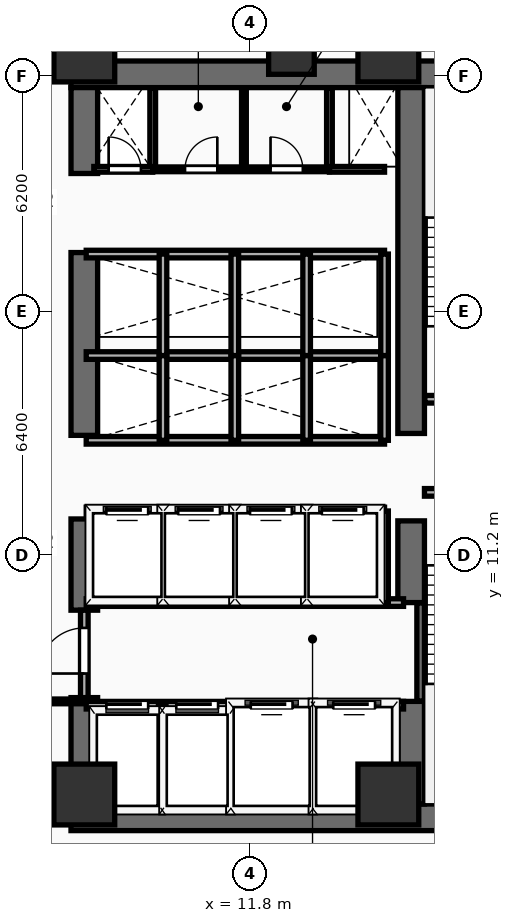
"""IFC4 building model, lengths in metres.
Left out: names, types, materials, properties, quantities, classifications, styles, units other than length and angle.
Written with IfcOpenShell. Run it as: python <this file> out.ifc"""

import sys

from ifc_helpers import new_model, si_unit, direction, frame, frame_2d, origin, origin_2d, place, context, subcontext, project, spatial, rectangle, extrude, element, fill, save


model = new_model("IFC4")
c1 = context("Model", 3, precision=1e-05, world=origin(), true_north=direction((0.0, 1.0)))
c2 = subcontext(c1, "Body", "Model", "MODEL_VIEW")
j1 = project(units=[si_unit("LENGTHUNIT", "METRE"), si_unit("PLANEANGLEUNIT", "RADIAN")], contexts=[c1])
p1 = place(None, origin())
s1 = spatial("IfcSite", under=j1, at=p1, CompositionType="ELEMENT")
p2 = place(p1, origin())
s2 = spatial("IfcBuilding", under=s1, at=p2, CompositionType="ELEMENT")
p3 = place(p2, frame((0.0, 0.0, 41.0)))
s3 = spatial("IfcBuildingStorey", under=s2, at=p3, CompositionType="ELEMENT", Elevation=41.0)
for number, where, z_axis, x_axis in (
    (1, (7.1, 4.3, 0.0), (0.0, 0.0, 1.0), (1.0, 0.0, 0.0)),
    (2, (7.1, 23.85, 0.0), (0.0, 0.0, 1.0), (1.0, 0.0, 0.0)),
):
    element("IfcWall", number, at=place(p3, frame(where, z_axis=z_axis, x_axis=x_axis)), inside=s3, PredefinedType="SHEAR", context=c2, shape_type="SweptSolid", body=[
        extrude(rectangle(XDim=14.05, YDim=0.7, at=frame_2d((7.025, 0.0))), origin(), (0.0, 0.0, 1.0), 3.54),
    ])
p4 = place(p3, frame((7.45, 4.65, 0.0), z_axis=(0.0, 0.0, 1.0), x_axis=(0.0, 1.0, 0.0)))
e3 = element("IfcWall", 3, at=p4, inside=s3, PredefinedType="SHEAR", context=c2, shape_type="SweptSolid", body=[
    extrude(rectangle(XDim=2.8, YDim=0.7, at=frame_2d((1.4, 0.0))), origin(), (0.0, 0.0, 1.0), 3.54),
])
p5 = place(p3, frame((7.45, 9.75, 0.0), z_axis=(0.0, 0.0, 1.0), x_axis=(0.0, 1.0, 0.0)))
e4 = element("IfcWall", 4, at=p5, inside=s3, PredefinedType="SHEAR", context=c2, shape_type="SweptSolid", body=[
    extrude(rectangle(XDim=2.4, YDim=0.7, at=frame_2d((1.2, 0.0))), origin(), (0.0, 0.0, 1.0), 3.54),
])
p6 = place(p3, frame((7.45, 14.35, 0.0), z_axis=(0.0, 0.0, 1.0), x_axis=(0.0, 1.0, 0.0)))
e5 = element("IfcWall", 5, at=p6, inside=s3, PredefinedType="SHEAR", context=c2, shape_type="SweptSolid", body=[
    extrude(rectangle(XDim=4.81, YDim=0.7, at=frame_2d((2.405, 0.0))), origin(), (0.0, 0.0, 1.0), 3.54),
])
p7 = place(p3, frame((7.45, 21.24, 0.0), z_axis=(0.0, 0.0, 1.0), x_axis=(0.0, 1.0, 0.0)))
e6 = element("IfcWall", 6, at=p7, inside=s3, PredefinedType="SHEAR", context=c2, shape_type="SweptSolid", body=[
    extrude(rectangle(XDim=2.26, YDim=0.7, at=frame_2d((1.13, 0.0))), origin(), (0.0, 0.0, 1.0), 3.54),
])
p8 = place(p3, frame((16.05, 4.65, 0.0), z_axis=(0.0, 0.0, 1.0), x_axis=(0.0, 1.0, 0.0)))
e7 = element("IfcWall", 7, at=p8, inside=s3, PredefinedType="SHEAR", context=c2, shape_type="SweptSolid", body=[
    extrude(rectangle(XDim=2.7, YDim=0.7, at=frame_2d((1.35, 0.0))), origin(), (0.0, 0.0, 1.0), 3.54),
])
p9 = place(p3, frame((16.05, 9.95, 0.0), z_axis=(0.0, 0.0, 1.0), x_axis=(0.0, 1.0, 0.0)))
e8 = element("IfcWall", 8, at=p9, inside=s3, PredefinedType="SHEAR", context=c2, shape_type="SweptSolid", body=[
    extrude(rectangle(XDim=2.15, YDim=0.7, at=frame_2d((1.075, 0.0))), origin(), (0.0, 0.0, 1.0), 3.54),
])
p10 = place(p3, frame((16.05, 14.4, 0.0), z_axis=(0.0, 0.0, 1.0), x_axis=(0.0, 1.0, 0.0)))
e9 = element("IfcWall", 9, at=p10, inside=s3, PredefinedType="SHEAR", context=c2, shape_type="SweptSolid", body=[
    extrude(rectangle(XDim=9.1, YDim=0.7, at=frame_2d((4.55, 0.0))), origin(), (0.0, 0.0, 1.0), 3.54),
])
for number, where, z_axis, x_axis in (
    (10, (7.45, 4.9, 0.0), (0.0, 0.0, 1.0), (1.0, 0.0, 0.0)),
    (11, (15.45, 4.9, 0.0), (0.0, 0.0, 1.0), (1.0, 0.0, 0.0)),
    (12, (7.45, 24.45, 0.0), (0.0, 0.0, 1.0), (1.0, 0.0, 0.0)),
    (13, (15.45, 24.45, 0.0), (0.0, 0.0, 1.0), (1.0, 0.0, 0.0)),
):
    element("IfcColumn", number, at=place(p3, frame(where, z_axis=z_axis, x_axis=x_axis)), inside=s3, PredefinedType="COLUMN", context=c2, shape_type="SweptSolid", body=[
        extrude(rectangle(XDim=1.6, YDim=1.6, at=origin_2d()), origin(), (0.0, 0.0, 1.0), 3.54),
    ])
p11 = place(p3, frame((12.9, 24.45, 0.0), z_axis=(0.0, 0.0, 1.0), x_axis=(1.0, 0.0, 0.0)))
e14 = element("IfcColumn", 14, at=p11, inside=s3, PredefinedType="COLUMN", context=c2, shape_type="SweptSolid", body=[
    extrude(rectangle(XDim=1.2, YDim=1.2, at=origin_2d()), origin(), (0.0, 0.0, 1.0), 3.54),
])
p12 = place(p3, frame((16.3, 7.36, 0.0), z_axis=(0.0, 0.0, 1.0), x_axis=(0.0, 1.0, 0.0)))
e15 = element("IfcWall", 15, at=p12, inside=s3, PredefinedType="SHEAR", context=c2, shape_type="SweptSolid", body=[
    extrude(rectangle(XDim=2.58, YDim=0.2, at=frame_2d((1.29, 0.0))), origin(), (0.0, 0.0, 1.0), 3.54),
])
p13 = place(p3, frame((16.4, 12.85, 0.0), z_axis=(0.0, 0.0, 1.0), x_axis=(1.0, 0.0, 0.0)))
e16 = element("IfcWall", 16, at=p13, inside=s3, PredefinedType="PARTITIONING", context=c2, shape_type="SweptSolid", body=[
    extrude(rectangle(XDim=3.96, YDim=0.2, at=frame_2d((1.98, 0.0))), origin(), (0.0, 0.0, 1.0), 3.54),
])
p14 = place(p13, frame((1.304, 0.0, 0.0)))
e17 = element("IfcOpeningElement", 17, at=p14, cuts=e16, PredefinedType="OPENING", context=c2, shape_type="SweptSolid", body=[
    extrude(rectangle(XDim=1.1, YDim=2.2, at=frame_2d((0.55, 1.1))), frame((0.0, 0.11, 0.0), z_axis=(0.0, -1.0, 0.0), x_axis=(1.0, 0.0, 0.0)), (0.0, 0.0, 1.0), 0.22),
])
p15 = place(p3, frame((16.41, 15.3, 0.0), z_axis=(0.0, 0.0, 1.0), x_axis=(1.0, 0.0, 0.0)))
e18 = element("IfcWall", 18, at=p15, inside=s3, PredefinedType="PARTITIONING", context=c2, shape_type="SweptSolid", body=[
    extrude(rectangle(XDim=3.95, YDim=0.2, at=frame_2d((1.975, 0.0))), origin(), (0.0, 0.0, 1.0), 3.54),
])
p16 = place(p15, frame((1.294, 0.0, 0.0)))
e19 = element("IfcOpeningElement", 19, at=p16, cuts=e18, PredefinedType="OPENING", context=c2, shape_type="SweptSolid", body=[
    extrude(rectangle(XDim=1.1, YDim=2.2, at=frame_2d((0.55, 1.1))), frame((0.0, 0.11, 0.0), z_axis=(0.0, -1.0, 0.0), x_axis=(1.0, 0.0, 0.0)), (0.0, 0.0, 1.0), 0.22),
])
p17 = place(p3, frame((7.5, 7.25, 0.0), z_axis=(0.0, 0.0, 1.0), x_axis=(1.0, 0.0, 0.0)))
e20 = element("IfcWall", 20, at=p17, inside=s3, PredefinedType="PARTITIONING", context=c2, shape_type="SweptSolid", body=[
    extrude(rectangle(XDim=8.35, YDim=0.2, at=frame_2d((4.175, 0.0))), origin(), (0.0, 0.0, 1.0), 3.54),
])
p18 = place(p17, frame((0.53, 0.0, 0.0)))
e21 = element("IfcOpeningElement", 21, at=p18, cuts=e20, PredefinedType="OPENING", context=c2, shape_type="SweptSolid", body=[
    extrude(rectangle(XDim=1.1, YDim=2.2, at=frame_2d((0.55, 1.1))), frame((0.0, 0.11, 0.0), z_axis=(0.0, -1.0, 0.0), x_axis=(1.0, 0.0, 0.0)), (0.0, 0.0, 1.0), 0.22),
])
p19 = place(p17, frame((2.37, 0.0, 0.0)))
e22 = element("IfcOpeningElement", 22, at=p19, cuts=e20, PredefinedType="OPENING", context=c2, shape_type="SweptSolid", body=[
    extrude(rectangle(XDim=1.1, YDim=2.2, at=frame_2d((0.55, 1.1))), frame((0.0, 0.11, 0.0), z_axis=(0.0, -1.0, 0.0), x_axis=(1.0, 0.0, 0.0)), (0.0, 0.0, 1.0), 0.22),
])
p20 = place(p17, frame((4.33, 0.0, 0.0)))
e23 = element("IfcOpeningElement", 23, at=p20, cuts=e20, PredefinedType="OPENING", context=c2, shape_type="SweptSolid", body=[
    extrude(rectangle(XDim=1.1, YDim=2.2, at=frame_2d((0.55, 1.1))), frame((0.0, 0.11, 0.0), z_axis=(0.0, -1.0, 0.0), x_axis=(1.0, 0.0, 0.0)), (0.0, 0.0, 1.0), 0.22),
])
p21 = place(p17, frame((6.5, 0.0, 0.0)))
e24 = element("IfcOpeningElement", 24, at=p21, cuts=e20, PredefinedType="OPENING", context=c2, shape_type="SweptSolid", body=[
    extrude(rectangle(XDim=1.1, YDim=2.2, at=frame_2d((0.55, 1.1))), frame((0.0, 0.11, 0.0), z_axis=(0.0, -1.0, 0.0), x_axis=(1.0, 0.0, 0.0)), (0.0, 0.0, 1.0), 0.22),
])
p22 = place(p3, frame((7.5, 9.95, 0.0), z_axis=(0.0, 0.0, 1.0), x_axis=(1.0, 0.0, 0.0)))
e25 = element("IfcWall", 25, at=p22, inside=s3, PredefinedType="PARTITIONING", context=c2, shape_type="SweptSolid", body=[
    extrude(rectangle(XDim=8.35, YDim=0.2, at=frame_2d((4.175, 0.0))), origin(), (0.0, 0.0, 1.0), 3.54),
])
for number, where, z_axis, x_axis in (
    (26, (9.5, 4.45, 0.0), (0.0, 0.0, 1.0), (0.0, 1.0, 0.0)),
    (27, (11.36, 4.45, 0.0), (0.0, 0.0, 1.0), (0.0, 1.0, 0.0)),
    (28, (13.46, 4.45, 0.0), (0.0, 0.0, 1.0), (0.0, 1.0, 0.0)),
):
    element("IfcWall", number, at=place(p3, frame(where, z_axis=z_axis, x_axis=x_axis)), inside=s3, PredefinedType="PARTITIONING", context=c2, shape_type="SweptSolid", body=[
        extrude(rectangle(XDim=2.8, YDim=0.2, at=frame_2d((1.4, 0.0))), origin(), (0.0, 0.0, 1.0), 3.54),
    ])
p23 = place(p3, frame((7.45, 7.45, 0.0), z_axis=(0.0, 0.0, 1.0), x_axis=(0.0, 1.0, 0.0)))
e29 = element("IfcWall", 29, at=p23, inside=s3, PredefinedType="PARTITIONING", context=c2, shape_type="SweptSolid", body=[
    extrude(rectangle(XDim=2.3, YDim=0.2, at=frame_2d((1.15, 0.0))), origin(), (0.0, 0.0, 1.0), 2.52),
])
p24 = place(p23, frame((0.633, 0.0, 0.0)))
e30 = element("IfcOpeningElement", 30, at=p24, cuts=e29, PredefinedType="OPENING", context=c2, shape_type="SweptSolid", body=[
    extrude(rectangle(XDim=1.2, YDim=2.25, at=frame_2d((0.6, 1.125))), frame((0.0, 0.11, 0.0), z_axis=(0.0, -1.0, 0.0), x_axis=(1.0, 0.0, 0.0)), (0.0, 0.0, 1.0), 0.22),
])
p25 = place(p3, frame((7.5, 12.36, 0.0), z_axis=(0.0, 0.0, 1.0), x_axis=(1.0, 0.0, 0.0)))
e31 = element("IfcWall", 31, at=p25, inside=s3, PredefinedType="PARTITIONING", context=c2, shape_type="SweptSolid", body=[
    extrude(rectangle(XDim=7.85, YDim=0.2, at=frame_2d((3.925, 0.0))), origin(), (0.0, 0.0, 1.0), 3.54),
])
p26 = place(p25, frame((0.53, 0.0, 0.0)))
e32 = element("IfcOpeningElement", 32, at=p26, cuts=e31, PredefinedType="OPENING", context=c2, shape_type="SweptSolid", body=[
    extrude(rectangle(XDim=1.1, YDim=2.2, at=frame_2d((0.55, 1.1))), frame((0.0, 0.11, 0.0), z_axis=(0.0, -1.0, 0.0), x_axis=(1.0, 0.0, 0.0)), (0.0, 0.0, 1.0), 0.22),
])
p27 = place(p25, frame((2.42, 0.0, 0.0)))
e33 = element("IfcOpeningElement", 33, at=p27, cuts=e31, PredefinedType="OPENING", context=c2, shape_type="SweptSolid", body=[
    extrude(rectangle(XDim=1.1, YDim=2.2, at=frame_2d((0.55, 1.1))), frame((0.0, 0.11, 0.0), z_axis=(0.0, -1.0, 0.0), x_axis=(1.0, 0.0, 0.0)), (0.0, 0.0, 1.0), 0.22),
])
p28 = place(p25, frame((4.31, 0.0, 0.0)))
e34 = element("IfcOpeningElement", 34, at=p28, cuts=e31, PredefinedType="OPENING", context=c2, shape_type="SweptSolid", body=[
    extrude(rectangle(XDim=1.1, YDim=2.2, at=frame_2d((0.55, 1.1))), frame((0.0, 0.11, 0.0), z_axis=(0.0, -1.0, 0.0), x_axis=(1.0, 0.0, 0.0)), (0.0, 0.0, 1.0), 0.22),
])
p29 = place(p25, frame((6.2, 0.0, 0.0)))
e35 = element("IfcOpeningElement", 35, at=p29, cuts=e31, PredefinedType="OPENING", context=c2, shape_type="SweptSolid", body=[
    extrude(rectangle(XDim=1.1, YDim=2.2, at=frame_2d((0.55, 1.1))), frame((0.0, 0.11, 0.0), z_axis=(0.0, -1.0, 0.0), x_axis=(1.0, 0.0, 0.0)), (0.0, 0.0, 1.0), 0.22),
])
for number, where, z_axis, x_axis in (
    (36, (15.35, 9.95, 0.0), (0.0, 0.0, 1.0), (0.0, 1.0, 0.0)),
    (37, (9.52, 9.95, 0.0), (0.0, 0.0, 1.0), (0.0, 1.0, 0.0)),
    (38, (11.41, 9.95, 0.0), (0.0, 0.0, 1.0), (0.0, 1.0, 0.0)),
    (39, (13.3, 9.95, 0.0), (0.0, 0.0, 1.0), (0.0, 1.0, 0.0)),
):
    element("IfcWall", number, at=place(p3, frame(where, z_axis=z_axis, x_axis=x_axis)), inside=s3, PredefinedType="PARTITIONING", context=c2, shape_type="SweptSolid", body=[
        extrude(rectangle(XDim=2.41, YDim=0.2, at=frame_2d((1.205, 0.0))), origin(), (0.0, 0.0, 1.0), 3.54),
    ])
for number, where, z_axis, x_axis in (
    (40, (7.5, 14.22, 0.0), (0.0, 0.0, 1.0), (1.0, 0.0, 0.0)),
    (41, (7.5, 16.45, 0.0), (0.0, 0.0, 1.0), (1.0, 0.0, 0.0)),
):
    element("IfcWall", number, at=place(p3, frame(where, z_axis=z_axis, x_axis=x_axis)), inside=s3, PredefinedType="PARTITIONING", context=c2, shape_type="SweptSolid", body=[
        extrude(rectangle(XDim=7.85, YDim=0.2, at=frame_2d((3.925, 0.0))), origin(), (0.0, 0.0, 1.0), 3.54),
    ])
for number, where, z_axis, x_axis in (
    (42, (15.35, 14.22, 0.0), (0.0, 0.0, 1.0), (0.0, 1.0, 0.0)),
    (43, (9.52, 14.22, 0.0), (0.0, 0.0, 1.0), (0.0, 1.0, 0.0)),
    (44, (11.41, 14.22, 0.0), (0.0, 0.0, 1.0), (0.0, 1.0, 0.0)),
    (45, (13.3, 14.22, 0.0), (0.0, 0.0, 1.0), (0.0, 1.0, 0.0)),
):
    element("IfcWall", number, at=place(p3, frame(where, z_axis=z_axis, x_axis=x_axis)), inside=s3, PredefinedType="PARTITIONING", context=c2, shape_type="SweptSolid", body=[
        extrude(rectangle(XDim=2.23, YDim=0.2, at=frame_2d((1.115, 0.0))), origin(), (0.0, 0.0, 1.0), 3.54),
    ])
p30 = place(p3, frame((7.5, 19.12, 0.0), z_axis=(0.0, 0.0, 1.0), x_axis=(1.0, 0.0, 0.0)))
e46 = element("IfcWall", 46, at=p30, inside=s3, PredefinedType="PARTITIONING", context=c2, shape_type="SweptSolid", body=[
    extrude(rectangle(XDim=7.85, YDim=0.2, at=frame_2d((3.925, 0.0))), origin(), (0.0, 0.0, 1.0), 3.54),
])
for number, where, z_axis, x_axis in (
    (47, (15.35, 16.45, 0.0), (0.0, 0.0, 1.0), (0.0, 1.0, 0.0)),
    (48, (9.52, 16.45, 0.0), (0.0, 0.0, 1.0), (0.0, 1.0, 0.0)),
    (49, (11.41, 16.45, 0.0), (0.0, 0.0, 1.0), (0.0, 1.0, 0.0)),
    (50, (13.3, 16.45, 0.0), (0.0, 0.0, 1.0), (0.0, 1.0, 0.0)),
):
    element("IfcWall", number, at=place(p3, frame(where, z_axis=z_axis, x_axis=x_axis)), inside=s3, PredefinedType="PARTITIONING", context=c2, shape_type="SweptSolid", body=[
        extrude(rectangle(XDim=2.67, YDim=0.2, at=frame_2d((1.335, 0.0))), origin(), (0.0, 0.0, 1.0), 3.54),
    ])
for number, where, z_axis, x_axis in (
    (51, (9.25, 21.35, 0.0), (0.0, 0.0, 1.0), (0.0, 1.0, 0.0)),
    (52, (13.9, 21.35, 0.0), (0.0, 0.0, 1.0), (0.0, 1.0, 0.0)),
):
    element("IfcWall", number, at=place(p3, frame(where, z_axis=z_axis, x_axis=x_axis)), inside=s3, PredefinedType="PARTITIONING", context=c2, shape_type="SweptSolid", body=[
        extrude(rectangle(XDim=2.13, YDim=0.15, at=frame_2d((1.065, 0.0))), origin(), (0.0, 0.0, 1.0), 3.54),
    ])
p31 = place(p3, frame((7.7, 21.35, 0.0), z_axis=(0.0, 0.0, 1.0), x_axis=(1.0, 0.0, 0.0)))
e53 = element("IfcWall", 53, at=p31, inside=s3, PredefinedType="PARTITIONING", context=c2, shape_type="SweptSolid", body=[
    extrude(rectangle(XDim=1.55, YDim=0.15, at=frame_2d((0.775, 0.0))), origin(), (0.0, 0.0, 1.0), 3.54),
])
p32 = place(p31, frame((0.39, 0.0, 0.0)))
e54 = element("IfcOpeningElement", 54, at=p32, cuts=e53, PredefinedType="OPENING", context=c2, shape_type="SweptSolid", body=[
    extrude(rectangle(XDim=0.85, YDim=2.15, at=frame_2d((0.425, 1.075))), frame((0.0, 0.085, 0.0), z_axis=(0.0, -1.0, 0.0), x_axis=(1.0, 0.0, 0.0)), (0.0, 0.0, 1.0), 0.17),
])
p33 = place(p3, frame((13.9, 21.35, 0.0), z_axis=(0.0, 0.0, 1.0), x_axis=(1.0, 0.0, 0.0)))
e55 = element("IfcWall", 55, at=p33, inside=s3, PredefinedType="PARTITIONING", context=c2, shape_type="SweptSolid", body=[
    extrude(rectangle(XDim=1.45, YDim=0.15, at=frame_2d((0.725, 0.0))), origin(), (0.0, 0.0, 1.0), 3.54),
])
p34 = place(p3, frame((9.25, 21.35, 0.0), z_axis=(0.0, 0.0, 1.0), x_axis=(1.0, 0.0, 0.0)))
e56 = element("IfcWall", 56, at=p34, inside=s3, PredefinedType="PARTITIONING", context=c2, shape_type="SweptSolid", body=[
    extrude(rectangle(XDim=4.65, YDim=0.125, at=frame_2d((2.325, 0.0))), origin(), (0.0, 0.0, 1.0), 3.54),
])
p35 = place(p34, frame((0.85, 0.0, 0.0)))
e57 = element("IfcOpeningElement", 57, at=p35, cuts=e56, PredefinedType="OPENING", context=c2, shape_type="SweptSolid", body=[
    extrude(rectangle(XDim=0.85, YDim=2.15, at=frame_2d((0.425, 1.075))), frame((0.0, 0.073, 0.0), z_axis=(0.0, -1.0, 0.0), x_axis=(1.0, 0.0, 0.0)), (0.0, 0.0, 1.0), 0.145),
])
p36 = place(p34, frame((3.1, 0.0, 0.0)))
e58 = element("IfcOpeningElement", 58, at=p36, cuts=e56, PredefinedType="OPENING", context=c2, shape_type="SweptSolid", body=[
    extrude(rectangle(XDim=0.85, YDim=2.15, at=frame_2d((0.425, 1.075))), frame((0.0, 0.073, 0.0), z_axis=(0.0, -1.0, 0.0), x_axis=(1.0, 0.0, 0.0)), (0.0, 0.0, 1.0), 0.145),
])
p37 = place(p3, frame((11.65, 21.35, 0.0), z_axis=(0.0, 0.0, 1.0), x_axis=(0.0, 1.0, 0.0)))
e59 = element("IfcWall", 59, at=p37, inside=s3, PredefinedType="PARTITIONING", context=c2, shape_type="SweptSolid", body=[
    extrude(rectangle(XDim=2.13, YDim=0.125, at=frame_2d((1.065, 0.0))), origin(), (0.0, 0.0, 1.0), 3.54),
])
p38 = place(p3, frame((1.64, 7.35, 0.0), z_axis=(0.0, 0.0, 1.0), x_axis=(1.0, 0.0, 0.0)))
e60 = element("IfcWall", 60, at=p38, inside=s3, PredefinedType="PARTITIONING", context=c2, shape_type="SweptSolid", body=[
    extrude(rectangle(XDim=5.76, YDim=0.125, at=frame_2d((2.88, 0.0))), origin(), (0.0, 0.0, 1.0), 3.54),
])
p39 = place(p38, frame((4.087, 0.0, 0.0)))
e61 = element("IfcOpeningElement", 61, at=p39, cuts=e60, PredefinedType="OPENING", context=c2, shape_type="SweptSolid", body=[
    extrude(rectangle(XDim=0.85, YDim=2.15, at=frame_2d((0.425, 1.075))), frame((0.0, 0.073, 0.0), z_axis=(0.0, -1.0, 0.0), x_axis=(1.0, 0.0, 0.0)), (0.0, 0.0, 1.0), 0.145),
])
p40 = place(p18, origin())
e62 = element("IfcDoor", 62, at=p40, inside=s3, OperationType="SLIDING_TO_LEFT", PredefinedType="DOOR", context=c2, shape_type="SweptSolid", body=[
    extrude(rectangle(XDim=1.1, YDim=2.2, at=frame_2d((0.55, 1.1))), frame((0.0, 0.025, 0.0), z_axis=(0.0, -1.0, 0.0), x_axis=(1.0, 0.0, 0.0)), (0.0, 0.0, 1.0), 0.05),
])
fill(e21, e62)
p41 = place(p19, origin())
e63 = element("IfcDoor", 63, at=p41, inside=s3, OperationType="SLIDING_TO_LEFT", PredefinedType="DOOR", context=c2, shape_type="SweptSolid", body=[
    extrude(rectangle(XDim=1.1, YDim=2.2, at=frame_2d((0.55, 1.1))), frame((0.0, 0.025, 0.0), z_axis=(0.0, -1.0, 0.0), x_axis=(1.0, 0.0, 0.0)), (0.0, 0.0, 1.0), 0.05),
])
fill(e22, e63)
p42 = place(p20, origin())
e64 = element("IfcDoor", 64, at=p42, inside=s3, OperationType="SLIDING_TO_LEFT", PredefinedType="DOOR", context=c2, shape_type="SweptSolid", body=[
    extrude(rectangle(XDim=1.1, YDim=2.2, at=frame_2d((0.55, 1.1))), frame((0.0, 0.025, 0.0), z_axis=(0.0, -1.0, 0.0), x_axis=(1.0, 0.0, 0.0)), (0.0, 0.0, 1.0), 0.05),
])
fill(e23, e64)
p43 = place(p21, origin())
e65 = element("IfcDoor", 65, at=p43, inside=s3, OperationType="SLIDING_TO_LEFT", PredefinedType="DOOR", context=c2, shape_type="SweptSolid", body=[
    extrude(rectangle(XDim=1.1, YDim=2.2, at=frame_2d((0.55, 1.1))), frame((0.0, 0.025, 0.0), z_axis=(0.0, -1.0, 0.0), x_axis=(1.0, 0.0, 0.0)), (0.0, 0.0, 1.0), 0.05),
])
fill(e24, e65)
p44 = place(p24, frame((1.2, 0.0, 0.0), z_axis=(0.0, 0.0, 1.0), x_axis=(-1.0, 0.0, 0.0)))
e66 = element("IfcDoor", 66, at=p44, inside=s3, OperationType="SINGLE_SWING_RIGHT", PredefinedType="DOOR", context=c2, shape_type="SweptSolid", body=[
    extrude(rectangle(XDim=1.2, YDim=2.25, at=frame_2d((0.6, 1.125))), frame((0.0, 0.025, 0.0), z_axis=(0.0, -1.0, 0.0), x_axis=(1.0, 0.0, 0.0)), (0.0, 0.0, 1.0), 0.05),
])
fill(e30, e66)
p45 = place(p26, origin())
e67 = element("IfcDoor", 67, at=p45, inside=s3, OperationType="SLIDING_TO_LEFT", PredefinedType="DOOR", context=c2, shape_type="SweptSolid", body=[
    extrude(rectangle(XDim=1.1, YDim=2.2, at=frame_2d((0.55, 1.1))), frame((0.0, 0.025, 0.0), z_axis=(0.0, -1.0, 0.0), x_axis=(1.0, 0.0, 0.0)), (0.0, 0.0, 1.0), 0.05),
])
fill(e32, e67)
p46 = place(p27, origin())
e68 = element("IfcDoor", 68, at=p46, inside=s3, OperationType="SLIDING_TO_LEFT", PredefinedType="DOOR", context=c2, shape_type="SweptSolid", body=[
    extrude(rectangle(XDim=1.1, YDim=2.2, at=frame_2d((0.55, 1.1))), frame((0.0, 0.025, 0.0), z_axis=(0.0, -1.0, 0.0), x_axis=(1.0, 0.0, 0.0)), (0.0, 0.0, 1.0), 0.05),
])
fill(e33, e68)
p47 = place(p28, origin())
e69 = element("IfcDoor", 69, at=p47, inside=s3, OperationType="SLIDING_TO_LEFT", PredefinedType="DOOR", context=c2, shape_type="SweptSolid", body=[
    extrude(rectangle(XDim=1.1, YDim=2.2, at=frame_2d((0.55, 1.1))), frame((0.0, 0.025, 0.0), z_axis=(0.0, -1.0, 0.0), x_axis=(1.0, 0.0, 0.0)), (0.0, 0.0, 1.0), 0.05),
])
fill(e34, e69)
p48 = place(p29, origin())
e70 = element("IfcDoor", 70, at=p48, inside=s3, OperationType="SLIDING_TO_LEFT", PredefinedType="DOOR", context=c2, shape_type="SweptSolid", body=[
    extrude(rectangle(XDim=1.1, YDim=2.2, at=frame_2d((0.55, 1.1))), frame((0.0, 0.025, 0.0), z_axis=(0.0, -1.0, 0.0), x_axis=(1.0, 0.0, 0.0)), (0.0, 0.0, 1.0), 0.05),
])
fill(e35, e70)
p49 = place(p32, origin())
e71 = element("IfcDoor", 71, at=p49, inside=s3, OperationType="SINGLE_SWING_LEFT", PredefinedType="DOOR", context=c2, shape_type="SweptSolid", body=[
    extrude(rectangle(XDim=0.85, YDim=2.15, at=frame_2d((0.425, 1.075))), frame((0.0, 0.025, 0.0), z_axis=(0.0, -1.0, 0.0), x_axis=(1.0, 0.0, 0.0)), (0.0, 0.0, 1.0), 0.05),
])
fill(e54, e71)
p50 = place(p35, origin())
e72 = element("IfcDoor", 72, at=p50, inside=s3, OperationType="SINGLE_SWING_RIGHT", PredefinedType="DOOR", context=c2, shape_type="SweptSolid", body=[
    extrude(rectangle(XDim=0.85, YDim=2.15, at=frame_2d((0.425, 1.075))), frame((0.0, 0.025, 0.0), z_axis=(0.0, -1.0, 0.0), x_axis=(1.0, 0.0, 0.0)), (0.0, 0.0, 1.0), 0.05),
])
fill(e57, e72)
p51 = place(p36, origin())
e73 = element("IfcDoor", 73, at=p51, inside=s3, OperationType="SINGLE_SWING_LEFT", PredefinedType="DOOR", context=c2, shape_type="SweptSolid", body=[
    extrude(rectangle(XDim=0.85, YDim=2.15, at=frame_2d((0.425, 1.075))), frame((0.0, 0.025, 0.0), z_axis=(0.0, -1.0, 0.0), x_axis=(1.0, 0.0, 0.0)), (0.0, 0.0, 1.0), 0.05),
])
fill(e58, e73)
save(model, sys.argv[1])
